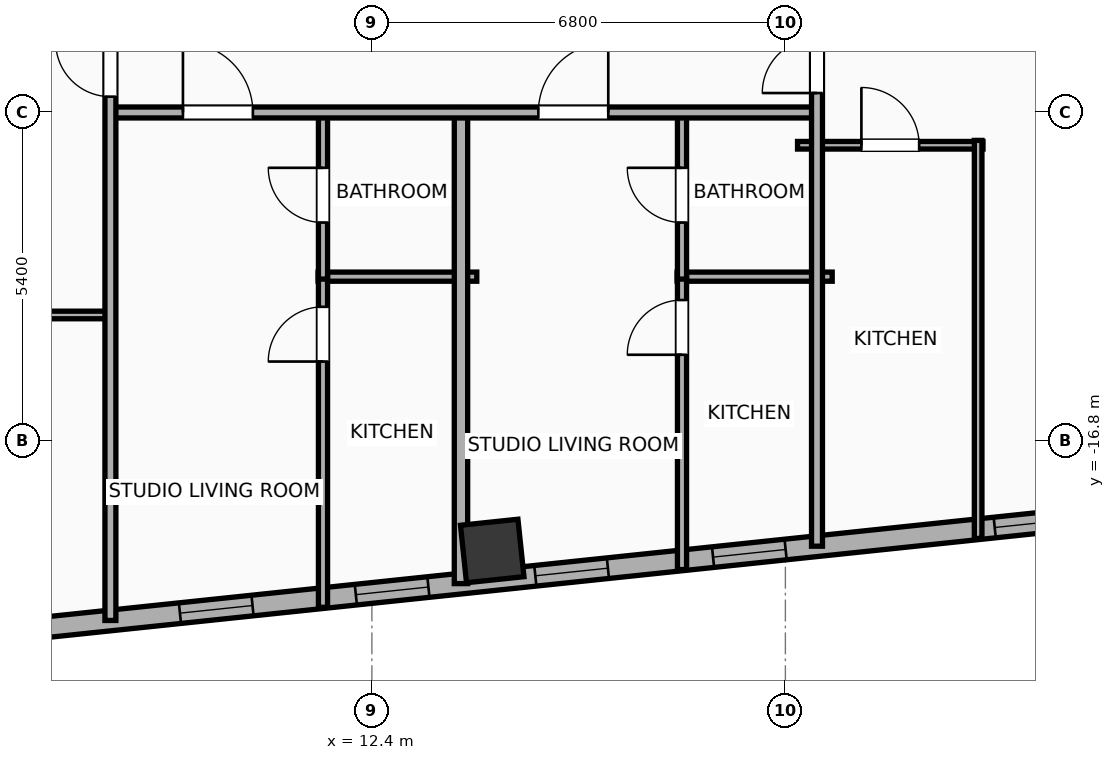
"""IFC4 building model, lengths in metres.
Left out: names, types, materials, properties, quantities, classifications, styles, units other than length and angle.
Written with IfcOpenShell. Run it as: python <this file> out.ifc"""

import sys

from ifc_helpers import new_model, si_unit, direction, frame, frame_2d, origin, origin_2d, place, context, subcontext, project, spatial, rectangle, hollow_rectangle, extrude, element, fill, save


model = new_model("IFC4")
c1 = context("Model", 3, precision=1e-05, world=origin(), true_north=direction((0.0, 1.0)))
c2 = subcontext(c1, "Body", "Model", "MODEL_VIEW")
j1 = project(units=[si_unit("LENGTHUNIT", "METRE"), si_unit("PLANEANGLEUNIT", "RADIAN")], contexts=[c1])
p1 = place(None, origin())
s1 = spatial("IfcSite", under=j1, at=p1, CompositionType="ELEMENT")
p2 = place(p1, origin())
s2 = spatial("IfcBuilding", under=s1, at=p2, CompositionType="ELEMENT")
p3 = place(p2, frame((0.0, 0.0, 152.1)))
s3 = spatial("IfcBuildingStorey", under=s2, at=p3, CompositionType="ELEMENT", Elevation=152.1)
p4 = place(p3, frame((14.379, -18.611, 0.0), z_axis=(0.0, 0.0, 1.0), x_axis=(0.994521895368, 0.104528463268, 0.0)))
e1 = element("IfcColumn", 1, at=p4, inside=s3, PredefinedType="COLUMN", context=c2, shape_type="SweptSolid", body=[
    extrude(hollow_rectangle(XDim=0.95, YDim=0.95, WallThickness=0.032, at=origin_2d()), origin(), (0.0, 0.0, 1.0), 3.9),
])
p5 = place(p3, frame((24.756, -18.003, 0.0), z_axis=(0.0, 0.0, 1.0), x_axis=(-0.99452160744, -0.104531202687, 0.0)))
e2 = element("IfcWall", 2, at=p5, inside=s3, PredefinedType="ELEMENTEDWALL", context=c2, shape_type="SweptSolid", body=[
    extrude(rectangle(XDim=51.967, YDim=0.34, at=frame_2d((25.983, 0.0))), origin(), (0.0, 0.0, 1.0), 3.65),
])
p6 = place(p5, frame((25.633, 0.0, 0.75)))
e3 = element("IfcOpeningElement", 3, at=p6, cuts=e2, PredefinedType="OPENING", context=c2, shape_type="SweptSolid", body=[
    extrude(rectangle(XDim=2.4, YDim=2.1, at=frame_2d((1.2, 1.05))), frame((0.0, 0.18, 0.0), z_axis=(0.0, -1.0, 0.0), x_axis=(1.0, 0.0, 0.0)), (0.0, 0.0, 1.0), 0.36),
])
p7 = place(p5, frame((42.369, 0.0, 0.75)))
e4 = element("IfcOpeningElement", 4, at=p7, cuts=e2, PredefinedType="OPENING", context=c2, shape_type="SweptSolid", body=[
    extrude(rectangle(XDim=1.2, YDim=2.05, at=frame_2d((0.6, 1.025))), frame((0.0, 0.18, 0.0), z_axis=(0.0, -1.0, 0.0), x_axis=(1.0, 0.0, 0.0)), (0.0, 0.0, 1.0), 0.36),
])
p8 = place(p5, frame((34.085, 0.0, 0.75)))
e5 = element("IfcOpeningElement", 5, at=p8, cuts=e2, PredefinedType="OPENING", context=c2, shape_type="SweptSolid", body=[
    extrude(rectangle(XDim=1.2, YDim=2.05, at=frame_2d((0.6, 1.025))), frame((0.0, 0.18, 0.0), z_axis=(0.0, -1.0, 0.0), x_axis=(1.0, 0.0, 0.0)), (0.0, 0.0, 1.0), 0.36),
])
p9 = place(p5, frame((36.993, 0.0, 0.75)))
e6 = element("IfcOpeningElement", 6, at=p9, cuts=e2, PredefinedType="OPENING", context=c2, shape_type="SweptSolid", body=[
    extrude(rectangle(XDim=1.2, YDim=2.05, at=frame_2d((0.6, 1.025))), frame((0.0, 0.18, 0.0), z_axis=(0.0, -1.0, 0.0), x_axis=(1.0, 0.0, 0.0)), (0.0, 0.0, 1.0), 0.36),
])
p10 = place(p5, frame((14.397, 0.0, 0.75)))
e7 = element("IfcOpeningElement", 7, at=p10, cuts=e2, PredefinedType="OPENING", context=c2, shape_type="SweptSolid", body=[
    extrude(rectangle(XDim=1.2, YDim=2.05, at=frame_2d((0.6, 1.025))), frame((0.0, 0.18, 0.0), z_axis=(0.0, -1.0, 0.0), x_axis=(1.0, 0.0, 0.0)), (0.0, 0.0, 1.0), 0.36),
])
p11 = place(p5, frame((11.489, 0.0, 0.75)))
e8 = element("IfcOpeningElement", 8, at=p11, cuts=e2, PredefinedType="OPENING", context=c2, shape_type="SweptSolid", body=[
    extrude(rectangle(XDim=1.2, YDim=2.05, at=frame_2d((0.6, 1.025))), frame((0.0, 0.18, 0.0), z_axis=(0.0, -1.0, 0.0), x_axis=(1.0, 0.0, 0.0)), (0.0, 0.0, 1.0), 0.36),
])
p12 = place(p5, frame((8.521, 0.0, 0.75)))
e9 = element("IfcOpeningElement", 9, at=p12, cuts=e2, PredefinedType="OPENING", context=c2, shape_type="SweptSolid", body=[
    extrude(rectangle(XDim=1.2, YDim=2.05, at=frame_2d((0.6, 1.025))), frame((0.0, 0.18, 0.0), z_axis=(0.0, -1.0, 0.0), x_axis=(1.0, 0.0, 0.0)), (0.0, 0.0, 1.0), 0.36),
])
p13 = place(p5, frame((5.582, 0.0, 0.75)))
e10 = element("IfcOpeningElement", 10, at=p13, cuts=e2, PredefinedType="OPENING", context=c2, shape_type="SweptSolid", body=[
    extrude(rectangle(XDim=1.2, YDim=2.05, at=frame_2d((0.6, 1.025))), frame((0.0, 0.18, 0.0), z_axis=(0.0, -1.0, 0.0), x_axis=(1.0, 0.0, 0.0)), (0.0, 0.0, 1.0), 0.36),
])
p14 = place(p5, frame((29.313, 0.0, 0.75)))
e11 = element("IfcOpeningElement", 11, at=p14, cuts=e2, PredefinedType="OPENING", context=c2, shape_type="SweptSolid", body=[
    extrude(rectangle(XDim=1.2, YDim=2.05, at=frame_2d((0.6, 1.025))), frame((0.0, 0.18, 0.0), z_axis=(0.0, -1.0, 0.0), x_axis=(1.0, 0.0, 0.0)), (0.0, 0.0, 1.0), 0.36),
])
p15 = place(p5, frame((22.248, 0.0, 0.75)))
e12 = element("IfcOpeningElement", 12, at=p15, cuts=e2, PredefinedType="OPENING", context=c2, shape_type="SweptSolid", body=[
    extrude(rectangle(XDim=1.2, YDim=2.05, at=frame_2d((0.6, 1.025))), frame((0.0, 0.18, 0.0), z_axis=(0.0, -1.0, 0.0), x_axis=(1.0, 0.0, 0.0)), (0.0, 0.0, 1.0), 0.36),
])
p16 = place(p5, frame((18.186, 0.0, 0.75)))
e13 = element("IfcOpeningElement", 13, at=p16, cuts=e2, PredefinedType="OPENING", context=c2, shape_type="SweptSolid", body=[
    extrude(rectangle(XDim=1.2, YDim=2.05, at=frame_2d((0.6, 1.025))), frame((0.0, 0.18, 0.0), z_axis=(0.0, -1.0, 0.0), x_axis=(1.0, 0.0, 0.0)), (0.0, 0.0, 1.0), 0.36),
])
p17 = place(p5, frame((47.879, 0.0, 0.75)))
e14 = element("IfcOpeningElement", 14, at=p17, cuts=e2, PredefinedType="OPENING", context=c2, shape_type="SweptSolid", body=[
    extrude(rectangle(XDim=1.2, YDim=2.05, at=frame_2d((0.6, 1.025))), frame((0.0, 0.18, 0.0), z_axis=(0.0, -1.0, 0.0), x_axis=(1.0, 0.0, 0.0)), (0.0, 0.0, 1.0), 0.36),
])
p18 = place(p5, frame((49.844, 0.0, 0.75)))
e15 = element("IfcOpeningElement", 15, at=p18, cuts=e2, PredefinedType="OPENING", context=c2, shape_type="SweptSolid", body=[
    extrude(rectangle(XDim=1.2, YDim=2.05, at=frame_2d((0.6, 1.025))), frame((0.0, 0.18, 0.0), z_axis=(0.0, -1.0, 0.0), x_axis=(1.0, 0.0, 0.0)), (0.0, 0.0, 1.0), 0.36),
])
p19 = place(p5, frame((0.925, 0.0, 0.75)))
e16 = element("IfcOpeningElement", 16, at=p19, cuts=e2, PredefinedType="OPENING", context=c2, shape_type="SweptSolid", body=[
    extrude(rectangle(XDim=1.2, YDim=2.05, at=frame_2d((0.6, 1.025))), frame((0.0, 0.18, 0.0), z_axis=(0.0, -1.0, 0.0), x_axis=(1.0, 0.0, 0.0)), (0.0, 0.0, 1.0), 0.36),
])
p20 = place(p3, frame((11.516, -14.1, 0.0), z_axis=(0.0, 0.0, 1.0), x_axis=(1.0, 0.0, 0.0)))
e17 = element("IfcWall", 17, at=p20, inside=s3, PredefinedType="PLUMBINGWALL", context=c2, shape_type="SweptSolid", body=[
    extrude(rectangle(XDim=2.609, YDim=0.15, at=frame_2d((1.304, 0.0))), origin(), (0.0, 0.0, 1.0), 3.65),
])
p21 = place(p3, frame((11.596, -19.537, 0.0), z_axis=(0.0, 0.0, 1.0), x_axis=(0.0, 1.0, 0.0)))
e18 = element("IfcWall", 18, at=p21, inside=s3, PredefinedType="PLUMBINGWALL", context=c2, shape_type="SweptSolid", body=[
    extrude(rectangle(XDim=5.477, YDim=0.15, at=frame_2d((2.739, 0.0))), origin(), (0.0, 0.0, 1.0), 3.65),
])
p22 = place(p21, frame((4.041, 0.0, 0.0)))
e19 = element("IfcOpeningElement", 19, at=p22, cuts=e18, PredefinedType="OPENING", context=c2, shape_type="SweptSolid", body=[
    extrude(rectangle(XDim=0.9, YDim=2.05, at=frame_2d((0.45, 1.025))), frame((0.0, 0.085, 0.0), z_axis=(0.0, -1.0, 0.0), x_axis=(1.0, 0.0, 0.0)), (0.0, 0.0, 1.0), 0.17),
])
p23 = place(p3, frame((11.596, -14.14, 0.0), z_axis=(0.0, 0.0, 1.0), x_axis=(0.0, 1.0, 0.0)))
e20 = element("IfcWall", 20, at=p23, inside=s3, PredefinedType="PLUMBINGWALL", context=c2, shape_type="SweptSolid", body=[
    extrude(rectangle(XDim=2.76, YDim=0.15, at=frame_2d((1.38, 0.0))), origin(), (0.0, 0.0, 1.0), 3.65),
])
p24 = place(p23, frame((0.93, 0.0, 0.0)))
e21 = element("IfcOpeningElement", 21, at=p24, cuts=e20, PredefinedType="OPENING", context=c2, shape_type="SweptSolid", body=[
    extrude(rectangle(XDim=0.9, YDim=2.05, at=frame_2d((0.45, 1.025))), frame((0.0, 0.085, 0.0), z_axis=(0.0, -1.0, 0.0), x_axis=(1.0, 0.0, 0.0)), (0.0, 0.0, 1.0), 0.17),
])
p25 = place(p3, frame((13.865, -19.148, 0.0), z_axis=(0.0, 0.0, 1.0), x_axis=(0.0, 1.0, 0.0)))
e22 = element("IfcWall", 22, at=p25, inside=s3, PredefinedType="PARTITIONING", context=c2, shape_type="SweptSolid", body=[
    extrude(rectangle(XDim=7.828, YDim=0.22, at=frame_2d((3.914, 0.0))), origin(), (0.0, 0.0, 1.0), 3.65),
])
p26 = place(p3, frame((17.42, -14.1, 0.0), z_axis=(0.0, 0.0, 1.0), x_axis=(1.0, 0.0, 0.0)))
e23 = element("IfcWall", 23, at=p26, inside=s3, PredefinedType="PLUMBINGWALL", context=c2, shape_type="SweptSolid", body=[
    extrude(rectangle(XDim=2.55, YDim=0.15, at=frame_2d((1.275, 0.0))), origin(), (0.0, 0.0, 1.0), 3.65),
])
p27 = place(p3, frame((17.5, -18.917, 0.0), z_axis=(0.0, 0.0, 1.0), x_axis=(0.0, 1.0, 0.0)))
e24 = element("IfcWall", 24, at=p27, inside=s3, PredefinedType="PLUMBINGWALL", context=c2, shape_type="SweptSolid", body=[
    extrude(rectangle(XDim=4.856, YDim=0.15, at=frame_2d((2.428, 0.0))), origin(), (0.0, 0.0, 1.0), 3.65),
])
p28 = place(p27, frame((3.532, 0.0, 0.0)))
e25 = element("IfcOpeningElement", 25, at=p28, cuts=e24, PredefinedType="OPENING", context=c2, shape_type="SweptSolid", body=[
    extrude(rectangle(XDim=0.9, YDim=2.05, at=frame_2d((0.45, 1.025))), frame((0.0, 0.085, 0.0), z_axis=(0.0, -1.0, 0.0), x_axis=(1.0, 0.0, 0.0)), (0.0, 0.0, 1.0), 0.17),
])
p29 = place(p3, frame((17.5, -14.14, 0.0), z_axis=(0.0, 0.0, 1.0), x_axis=(0.0, 1.0, 0.0)))
e26 = element("IfcWall", 26, at=p29, inside=s3, PredefinedType="PLUMBINGWALL", context=c2, shape_type="SweptSolid", body=[
    extrude(rectangle(XDim=2.76, YDim=0.15, at=frame_2d((1.38, 0.0))), origin(), (0.0, 0.0, 1.0), 3.65),
])
p30 = place(p29, frame((0.93, 0.0, 0.0)))
e27 = element("IfcOpeningElement", 27, at=p30, cuts=e26, PredefinedType="OPENING", context=c2, shape_type="SweptSolid", body=[
    extrude(rectangle(XDim=0.9, YDim=2.05, at=frame_2d((0.45, 1.025))), frame((0.0, 0.085, 0.0), z_axis=(0.0, -1.0, 0.0), x_axis=(1.0, 0.0, 0.0)), (0.0, 0.0, 1.0), 0.17),
])
p31 = place(p3, frame((8.08, -11.4, 0.0), z_axis=(0.0, 0.0, 1.0), x_axis=(1.0, 0.0, 0.0)))
e28 = element("IfcWall", 28, at=p31, inside=s3, PredefinedType="PARTITIONING", context=c2, shape_type="SweptSolid", body=[
    extrude(rectangle(XDim=11.67, YDim=0.18, at=frame_2d((5.835, 0.0))), origin(), (0.0, 0.0, 1.0), 3.65),
])
p32 = place(p31, frame((1.213, 0.0, 0.0)))
e29 = element("IfcOpeningElement", 29, at=p32, cuts=e28, PredefinedType="OPENING", context=c2, shape_type="SweptSolid", body=[
    extrude(rectangle(XDim=1.15, YDim=2.05, at=frame_2d((0.575, 1.025))), frame((0.0, 0.1, 0.0), z_axis=(0.0, -1.0, 0.0), x_axis=(1.0, 0.0, 0.0)), (0.0, 0.0, 1.0), 0.2),
])
p33 = place(p31, frame((7.057, 0.0, 0.0)))
e30 = element("IfcOpeningElement", 30, at=p33, cuts=e28, PredefinedType="OPENING", context=c2, shape_type="SweptSolid", body=[
    extrude(rectangle(XDim=1.15, YDim=2.05, at=frame_2d((0.575, 1.025))), frame((0.0, 0.1, 0.0), z_axis=(0.0, -1.0, 0.0), x_axis=(1.0, 0.0, 0.0)), (0.0, 0.0, 1.0), 0.2),
])
p34 = place(p3, frame((0.02, -14.73, 0.0), z_axis=(0.0, 0.0, 1.0), x_axis=(1.0, 0.0, 0.0)))
e31 = element("IfcWall", 31, at=p34, inside=s3, PredefinedType="PARTITIONING", context=c2, shape_type="SweptSolid", body=[
    extrude(rectangle(XDim=8.06, YDim=0.125, at=frame_2d((4.03, 0.0))), origin(), (0.0, 0.0, 1.0), 3.65),
])
p35 = place(p34, frame((1.323, 0.0, 0.0)))
e32 = element("IfcOpeningElement", 32, at=p35, cuts=e31, PredefinedType="OPENING", context=c2, shape_type="SweptSolid", body=[
    extrude(rectangle(XDim=0.9, YDim=2.05, at=frame_2d((0.45, 1.025))), frame((0.0, 0.073, 0.0), z_axis=(0.0, -1.0, 0.0), x_axis=(1.0, 0.0, 0.0)), (0.0, 0.0, 1.0), 0.145),
])
p36 = place(p34, frame((5.837, 0.0, 0.0)))
e33 = element("IfcOpeningElement", 33, at=p36, cuts=e31, PredefinedType="OPENING", context=c2, shape_type="SweptSolid", body=[
    extrude(rectangle(XDim=0.9, YDim=2.05, at=frame_2d((0.45, 1.025))), frame((0.0, 0.073, 0.0), z_axis=(0.0, -1.0, 0.0), x_axis=(1.0, 0.0, 0.0)), (0.0, 0.0, 1.0), 0.145),
])
p37 = place(p3, frame((8.1, -19.754, 0.0), z_axis=(0.0, 0.0, 1.0), x_axis=(0.0, 1.0, 0.0)))
e34 = element("IfcWall", 34, at=p37, inside=s3, PredefinedType="PARTITIONING", context=c2, shape_type="SweptSolid", body=[
    extrude(rectangle(XDim=9.864, YDim=0.18, at=frame_2d((4.932, 0.0))), origin(), (0.0, 0.0, 1.0), 3.65),
])
p38 = place(p37, frame((8.614, 0.0, 0.0)))
e35 = element("IfcOpeningElement", 35, at=p38, cuts=e34, PredefinedType="OPENING", context=c2, shape_type="SweptSolid", body=[
    extrude(rectangle(XDim=0.9, YDim=2.05, at=frame_2d((0.45, 1.025))), frame((0.0, 0.1, 0.0), z_axis=(0.0, -1.0, 0.0), x_axis=(1.0, 0.0, 0.0)), (0.0, 0.0, 1.0), 0.2),
])
p39 = place(p3, frame((19.4, -11.939, 0.0), z_axis=(0.0, 0.0, 1.0), x_axis=(1.0, 0.0, 0.0)))
e36 = element("IfcWall", 36, at=p39, inside=s3, PredefinedType="PARTITIONING", context=c2, shape_type="SweptSolid", body=[
    extrude(rectangle(XDim=3.05, YDim=0.125, at=frame_2d((1.525, 0.0))), origin(), (0.0, 0.0, 1.0), 3.65),
])
p40 = place(p39, frame((1.05, 0.0, 0.0)))
e37 = element("IfcOpeningElement", 37, at=p40, cuts=e36, PredefinedType="OPENING", context=c2, shape_type="SweptSolid", body=[
    extrude(rectangle(XDim=0.95, YDim=2.05, at=frame_2d((0.475, 1.025))), frame((0.0, 0.073, 0.0), z_axis=(0.0, -1.0, 0.0), x_axis=(1.0, 0.0, 0.0)), (0.0, 0.0, 1.0), 0.145),
])
p41 = place(p3, frame((22.37, -18.405, 0.0), z_axis=(0.0, 0.0, 1.0), x_axis=(0.0, 1.0, 0.0)))
e38 = element("IfcWall", 38, at=p41, inside=s3, PredefinedType="PARTITIONING", context=c2, shape_type="SweptSolid", body=[
    extrude(rectangle(XDim=6.546, YDim=0.125, at=frame_2d((3.273, 0.0))), origin(), (0.0, 0.0, 1.0), 3.65),
])
p42 = place(p3, frame((19.72, -18.532, 0.0), z_axis=(0.0, 0.0, 1.0), x_axis=(0.0, 1.0, 0.0)))
e39 = element("IfcWall", 39, at=p42, inside=s3, PredefinedType="PARTITIONING", context=c2, shape_type="SweptSolid", body=[
    extrude(rectangle(XDim=18.532, YDim=0.18, at=frame_2d((9.266, 0.0))), origin(), (0.0, 0.0, 1.0), 3.65),
])
p43 = place(p42, frame((7.452, 0.0, 0.0)))
e40 = element("IfcOpeningElement", 40, at=p43, cuts=e39, PredefinedType="OPENING", context=c2, shape_type="SweptSolid", body=[
    extrude(rectangle(XDim=0.9, YDim=2.05, at=frame_2d((0.45, 1.025))), frame((0.0, 0.1, 0.0), z_axis=(0.0, -1.0, 0.0), x_axis=(1.0, 0.0, 0.0)), (0.0, 0.0, 1.0), 0.2),
])
p44 = place(p10, origin())
e41 = element("IfcWindow", 41, at=p44, inside=s3, PartitioningType="SINGLE_PANEL", PredefinedType="WINDOW", context=c2, shape_type="SweptSolid", body=[
    extrude(rectangle(XDim=1.2, YDim=2.05, at=frame_2d((0.6, 1.025))), frame((0.0, 0.03, 0.0), z_axis=(0.0, -1.0, 0.0), x_axis=(1.0, 0.0, 0.0)), (0.0, 0.0, 1.0), 0.06),
])
fill(e7, e41)
p45 = place(p11, origin())
e42 = element("IfcWindow", 42, at=p45, inside=s3, PartitioningType="SINGLE_PANEL", PredefinedType="WINDOW", context=c2, shape_type="SweptSolid", body=[
    extrude(rectangle(XDim=1.2, YDim=2.05, at=frame_2d((0.6, 1.025))), frame((0.0, 0.03, 0.0), z_axis=(0.0, -1.0, 0.0), x_axis=(1.0, 0.0, 0.0)), (0.0, 0.0, 1.0), 0.06),
])
fill(e8, e42)
p46 = place(p12, origin())
e43 = element("IfcWindow", 43, at=p46, inside=s3, PartitioningType="SINGLE_PANEL", PredefinedType="WINDOW", context=c2, shape_type="SweptSolid", body=[
    extrude(rectangle(XDim=1.2, YDim=2.05, at=frame_2d((0.6, 1.025))), frame((0.0, 0.03, 0.0), z_axis=(0.0, -1.0, 0.0), x_axis=(1.0, 0.0, 0.0)), (0.0, 0.0, 1.0), 0.06),
])
fill(e9, e43)
p47 = place(p13, origin())
e44 = element("IfcWindow", 44, at=p47, inside=s3, PartitioningType="SINGLE_PANEL", PredefinedType="WINDOW", context=c2, shape_type="SweptSolid", body=[
    extrude(rectangle(XDim=1.2, YDim=2.05, at=frame_2d((0.6, 1.025))), frame((0.0, 0.03, 0.0), z_axis=(0.0, -1.0, 0.0), x_axis=(1.0, 0.0, 0.0)), (0.0, 0.0, 1.0), 0.06),
])
fill(e10, e44)
p48 = place(p19, origin())
e45 = element("IfcWindow", 45, at=p48, inside=s3, PartitioningType="SINGLE_PANEL", PredefinedType="WINDOW", context=c2, shape_type="SweptSolid", body=[
    extrude(rectangle(XDim=1.2, YDim=2.05, at=frame_2d((0.6, 1.025))), frame((0.0, 0.03, 0.0), z_axis=(0.0, -1.0, 0.0), x_axis=(1.0, 0.0, 0.0)), (0.0, 0.0, 1.0), 0.06),
])
fill(e16, e45)
p49 = place(p22, origin())
e46 = element("IfcDoor", 46, at=p49, inside=s3, OperationType="SINGLE_SWING_LEFT", PredefinedType="DOOR", context=c2, shape_type="SweptSolid", body=[
    extrude(rectangle(XDim=0.9, YDim=2.05, at=frame_2d((0.45, 1.025))), frame((0.0, 0.025, 0.0), z_axis=(0.0, -1.0, 0.0), x_axis=(1.0, 0.0, 0.0)), (0.0, 0.0, 1.0), 0.05),
])
fill(e19, e46)
p50 = place(p24, origin())
e47 = element("IfcDoor", 47, at=p50, inside=s3, OperationType="SINGLE_SWING_RIGHT", PredefinedType="DOOR", context=c2, shape_type="SweptSolid", body=[
    extrude(rectangle(XDim=0.9, YDim=2.05, at=frame_2d((0.45, 1.025))), frame((0.0, 0.025, 0.0), z_axis=(0.0, -1.0, 0.0), x_axis=(1.0, 0.0, 0.0)), (0.0, 0.0, 1.0), 0.05),
])
fill(e21, e47)
p51 = place(p28, origin())
e48 = element("IfcDoor", 48, at=p51, inside=s3, OperationType="SINGLE_SWING_LEFT", PredefinedType="DOOR", context=c2, shape_type="SweptSolid", body=[
    extrude(rectangle(XDim=0.9, YDim=2.05, at=frame_2d((0.45, 1.025))), frame((0.0, 0.025, 0.0), z_axis=(0.0, -1.0, 0.0), x_axis=(1.0, 0.0, 0.0)), (0.0, 0.0, 1.0), 0.05),
])
fill(e25, e48)
p52 = place(p30, origin())
e49 = element("IfcDoor", 49, at=p52, inside=s3, OperationType="SINGLE_SWING_RIGHT", PredefinedType="DOOR", context=c2, shape_type="SweptSolid", body=[
    extrude(rectangle(XDim=0.9, YDim=2.05, at=frame_2d((0.45, 1.025))), frame((0.0, 0.025, 0.0), z_axis=(0.0, -1.0, 0.0), x_axis=(1.0, 0.0, 0.0)), (0.0, 0.0, 1.0), 0.05),
])
fill(e27, e49)
p53 = place(p32, origin())
e50 = element("IfcDoor", 50, at=p53, inside=s3, OperationType="SINGLE_SWING_LEFT", PredefinedType="DOOR", context=c2, shape_type="SweptSolid", body=[
    extrude(rectangle(XDim=1.15, YDim=2.05, at=frame_2d((0.575, 1.025))), frame((0.0, 0.025, 0.0), z_axis=(0.0, -1.0, 0.0), x_axis=(1.0, 0.0, 0.0)), (0.0, 0.0, 1.0), 0.05),
])
fill(e29, e50)
p54 = place(p33, origin())
e51 = element("IfcDoor", 51, at=p54, inside=s3, OperationType="SINGLE_SWING_RIGHT", PredefinedType="DOOR", context=c2, shape_type="SweptSolid", body=[
    extrude(rectangle(XDim=1.15, YDim=2.05, at=frame_2d((0.575, 1.025))), frame((0.0, 0.025, 0.0), z_axis=(0.0, -1.0, 0.0), x_axis=(1.0, 0.0, 0.0)), (0.0, 0.0, 1.0), 0.05),
])
fill(e30, e51)
p55 = place(p38, origin())
e52 = element("IfcDoor", 52, at=p55, inside=s3, OperationType="SINGLE_SWING_RIGHT", PredefinedType="DOOR", context=c2, shape_type="SweptSolid", body=[
    extrude(rectangle(XDim=0.9, YDim=2.05, at=frame_2d((0.45, 1.025))), frame((0.0, 0.025, 0.0), z_axis=(0.0, -1.0, 0.0), x_axis=(1.0, 0.0, 0.0)), (0.0, 0.0, 1.0), 0.05),
])
fill(e35, e52)
p56 = place(p40, origin())
e53 = element("IfcDoor", 53, at=p56, inside=s3, OperationType="SINGLE_SWING_LEFT", PredefinedType="DOOR", context=c2, shape_type="SweptSolid", body=[
    extrude(rectangle(XDim=0.95, YDim=2.05, at=frame_2d((0.475, 1.025))), frame((0.0, 0.025, 0.0), z_axis=(0.0, -1.0, 0.0), x_axis=(1.0, 0.0, 0.0)), (0.0, 0.0, 1.0), 0.05),
])
fill(e37, e53)
p57 = place(p43, origin())
e54 = element("IfcDoor", 54, at=p57, inside=s3, OperationType="SINGLE_SWING_LEFT", PredefinedType="DOOR", context=c2, shape_type="SweptSolid", body=[
    extrude(rectangle(XDim=0.9, YDim=2.05, at=frame_2d((0.45, 1.025))), frame((0.0, 0.025, 0.0), z_axis=(0.0, -1.0, 0.0), x_axis=(1.0, 0.0, 0.0)), (0.0, 0.0, 1.0), 0.05),
])
fill(e40, e54)
save(model, sys.argv[1])
